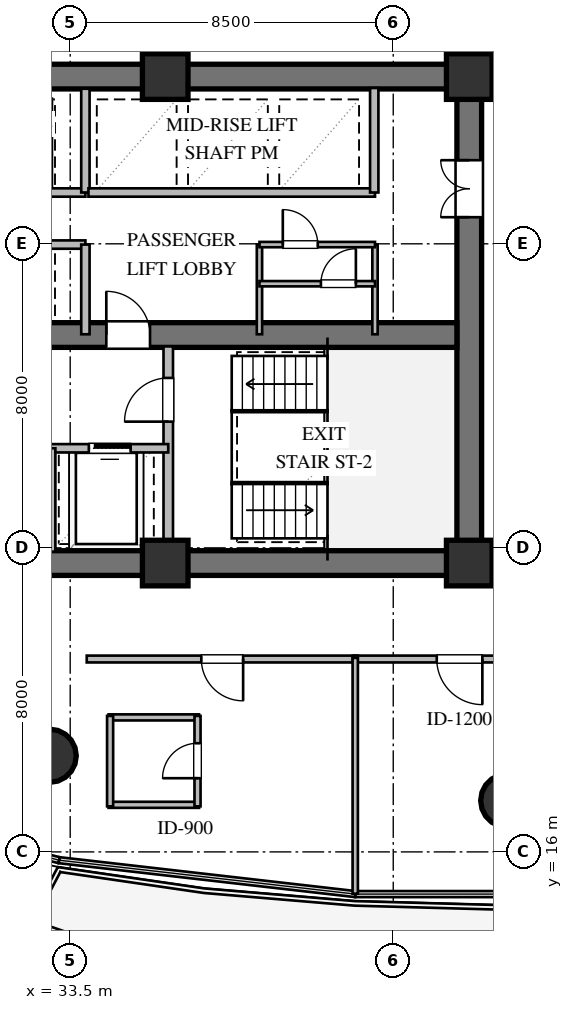
"""IFC4 building model, lengths in metres.
Left out: names, types, materials, properties, quantities, classifications, styles, units other than length and angle.
Written with IfcOpenShell. Run it as: python <this file> out.ifc"""

import sys

from ifc_helpers import new_model, si_unit, direction, frame, frame_2d, origin, origin_2d, place, context, subcontext, project, spatial, rectangle, circle, extrude, element, fill, save


model = new_model("IFC4")
c1 = context("Model", 3, precision=1e-05, world=origin(), true_north=direction((0.0, 1.0)))
c2 = subcontext(c1, "Body", "Model", "MODEL_VIEW")
j1 = project(units=[si_unit("LENGTHUNIT", "METRE"), si_unit("PLANEANGLEUNIT", "RADIAN")], contexts=[c1])
p1 = place(None, origin())
s1 = spatial("IfcSite", under=j1, at=p1, CompositionType="ELEMENT")
p2 = place(p1, origin())
s2 = spatial("IfcBuilding", under=s1, at=p2, CompositionType="ELEMENT")
p3 = place(p2, frame((0.0, 0.0, 24.0)))
s3 = spatial("IfcBuildingStorey", under=s2, at=p3, CompositionType="ELEMENT", Elevation=24.0)
for number, where, z_axis, x_axis in (
    (1, (21.675, 23.6, 0.0), (0.0, 0.0, 1.0), (1.0, 0.0, 0.0)),
    (2, (21.675, 36.4, 0.0), (0.0, 0.0, 1.0), (1.0, 0.0, 0.0)),
):
    element("IfcWall", number, at=place(p3, frame(where, z_axis=z_axis, x_axis=x_axis)), inside=s3, PredefinedType="SHEAR", context=c2, shape_type="SweptSolid", body=[
        extrude(rectangle(XDim=22.65, YDim=0.65, at=frame_2d((11.325, 0.0))), origin(), (0.0, 0.0, 1.0), 3.36),
    ])
p4 = place(p3, frame((44.0, 23.925, 0.0), z_axis=(0.0, 0.0, 1.0), x_axis=(0.0, 1.0, 0.0)))
e3 = element("IfcWall", 3, at=p4, inside=s3, PredefinedType="SHEAR", context=c2, shape_type="SweptSolid", body=[
    extrude(rectangle(XDim=12.15, YDim=0.65, at=frame_2d((6.075, 0.0))), origin(), (0.0, 0.0, 1.0), 3.36),
])
p5 = place(p4, frame((8.775, 0.0, 0.0)))
e4 = element("IfcOpeningElement", 4, at=p5, cuts=e3, PredefinedType="OPENING", context=c2, shape_type="SweptSolid", body=[
    extrude(rectangle(XDim=1.5, YDim=2.15, at=frame_2d((0.75, 1.075))), frame((0.0, 0.335, 0.0), z_axis=(0.0, -1.0, 0.0), x_axis=(1.0, 0.0, 0.0)), (0.0, 0.0, 1.0), 0.67),
])
p6 = place(p3, frame((22.325, 29.6, 0.0), z_axis=(0.0, 0.0, 1.0), x_axis=(1.0, 0.0, 0.0)))
e5 = element("IfcWall", 5, at=p6, inside=s3, PredefinedType="SHEAR", context=c2, shape_type="SweptSolid", body=[
    extrude(rectangle(XDim=21.35, YDim=0.65, at=frame_2d((10.675, 0.0))), origin(), (0.0, 0.0, 1.0), 3.36),
])
p7 = place(p6, frame((12.125, 0.0, 0.0)))
e6 = element("IfcOpeningElement", 6, at=p7, cuts=e5, PredefinedType="OPENING", context=c2, shape_type="SweptSolid", body=[
    extrude(rectangle(XDim=1.15, YDim=2.1, at=frame_2d((0.575, 1.05))), frame((0.0, 0.335, 0.0), z_axis=(0.0, -1.0, 0.0), x_axis=(1.0, 0.0, 0.0)), (0.0, 0.0, 1.0), 0.67),
])
for number, where, z_axis, x_axis in (
    (7, (36.0, 23.6, 0.0), (0.0, 0.0, 1.0), (1.0, 0.0, 0.0)),
    (8, (44.0, 23.6, 0.0), (0.0, 0.0, 1.0), (1.0, 0.0, 0.0)),
    (9, (44.0, 36.4, 0.0), (0.0, 0.0, 1.0), (1.0, 0.0, 0.0)),
    (10, (36.0, 36.4, 0.0), (0.0, 0.0, 1.0), (1.0, 0.0, 0.0)),
):
    element("IfcColumn", number, at=place(p3, frame(where, z_axis=z_axis, x_axis=x_axis)), inside=s3, PredefinedType="COLUMN", context=c2, shape_type="SweptSolid", body=[
        extrude(rectangle(XDim=1.2, YDim=1.2, at=origin_2d()), origin(), (0.0, 0.0, 1.0), 3.6),
    ])
for number, where, z_axis, x_axis in (
    (11, (32.96, 18.53, 0.0), (0.0, 0.0, 1.0), (1.0, 0.0, 0.0)),
    (12, (45.0, 17.35, 0.0), (0.0, 0.0, 1.0), (1.0, 0.0, 0.0)),
):
    element("IfcColumn", number, at=place(p3, frame(where, z_axis=z_axis, x_axis=x_axis)), inside=s3, PredefinedType="COLUMN", context=c2, shape_type="SweptSolid", body=[
        extrude(circle(Radius=0.7, at=origin_2d()), origin(), (0.0, 0.0, 1.0), 3.6),
    ])
p8 = place(p3, frame((36.08, 23.9, 0.0), z_axis=(0.0, 0.0, 1.0), x_axis=(0.0, 1.0, 0.0)))
e13 = element("IfcWall", 13, at=p8, inside=s3, PredefinedType="SOLIDWALL", context=c2, shape_type="SweptSolid", body=[
    extrude(rectangle(XDim=5.4, YDim=0.25, at=frame_2d((2.7, 0.0))), origin(), (0.0, 0.0, 1.0), 3.36),
])
p9 = place(p8, frame((3.421, 0.0, 0.0)))
e14 = element("IfcOpeningElement", 14, at=p9, cuts=e13, PredefinedType="OPENING", context=c2, shape_type="SweptSolid", body=[
    extrude(rectangle(XDim=1.15, YDim=2.1, at=frame_2d((0.575, 1.05))), frame((0.0, 0.135, 0.0), z_axis=(0.0, -1.0, 0.0), x_axis=(1.0, 0.0, 0.0)), (0.0, 0.0, 1.0), 0.27),
])
p10 = place(p3, frame((29.92, 26.62, 0.0), z_axis=(0.0, 0.0, 1.0), x_axis=(1.0, 0.0, 0.0)))
e15 = element("IfcWall", 15, at=p10, inside=s3, PredefinedType="SOLIDWALL", context=c2, shape_type="SweptSolid", body=[
    extrude(rectangle(XDim=6.16, YDim=0.22, at=frame_2d((3.08, 0.0))), origin(), (0.0, 0.0, 1.0), 3.36),
])
p11 = place(p10, frame((0.99, 0.0, 0.0)))
e16 = element("IfcOpeningElement", 16, at=p11, cuts=e15, PredefinedType="OPENING", context=c2, shape_type="SweptSolid", body=[
    extrude(rectangle(XDim=1.1, YDim=2.1, at=frame_2d((0.55, 1.05))), frame((0.0, 0.12, 0.0), z_axis=(0.0, -1.0, 0.0), x_axis=(1.0, 0.0, 0.0)), (0.0, 0.0, 1.0), 0.24),
])
p12 = place(p10, frame((4.07, 0.0, 0.0)))
e17 = element("IfcOpeningElement", 17, at=p12, cuts=e15, PredefinedType="OPENING", context=c2, shape_type="SweptSolid", body=[
    extrude(rectangle(XDim=1.1, YDim=2.1, at=frame_2d((0.55, 1.05))), frame((0.0, 0.12, 0.0), z_axis=(0.0, -1.0, 0.0), x_axis=(1.0, 0.0, 0.0)), (0.0, 0.0, 1.0), 0.24),
])
p13 = place(p3, frame((33.0, 23.9, 0.0), z_axis=(0.0, 0.0, 1.0), x_axis=(0.0, 1.0, 0.0)))
e18 = element("IfcWall", 18, at=p13, inside=s3, PredefinedType="SOLIDWALL", context=c2, shape_type="SweptSolid", body=[
    extrude(rectangle(XDim=2.72, YDim=0.22, at=frame_2d((1.36, 0.0))), origin(), (0.0, 0.0, 1.0), 3.36),
])
p14 = place(p3, frame((26.1, 31.98, 0.0), z_axis=(0.0, 0.0, 1.0), x_axis=(1.0, 0.0, 0.0)))
e19 = element("IfcWall", 19, at=p14, inside=s3, PredefinedType="SOLIDWALL", context=c2, shape_type="SweptSolid", body=[
    extrude(rectangle(XDim=7.8, YDim=0.22, at=frame_2d((3.9, 0.0))), origin(), (0.0, 0.0, 1.0), 3.36),
])
p15 = place(p3, frame((33.9, 29.62, 0.0), z_axis=(0.0, 0.0, 1.0), x_axis=(0.0, 1.0, 0.0)))
e20 = element("IfcWall", 20, at=p15, inside=s3, PredefinedType="SOLIDWALL", context=c2, shape_type="SweptSolid", body=[
    extrude(rectangle(XDim=2.36, YDim=0.22, at=frame_2d((1.18, 0.0))), origin(), (0.0, 0.0, 1.0), 3.36),
])
p16 = place(p3, frame((26.1, 33.35, 0.0), z_axis=(0.0, 0.0, 1.0), x_axis=(1.0, 0.0, 0.0)))
e21 = element("IfcWall", 21, at=p16, inside=s3, PredefinedType="SOLIDWALL", context=c2, shape_type="SweptSolid", body=[
    extrude(rectangle(XDim=7.8, YDim=0.22, at=frame_2d((3.9, 0.0))), origin(), (0.0, 0.0, 1.0), 3.36),
])
p17 = place(p16, frame((1.4, 0.0, 0.0)))
e22 = element("IfcOpeningElement", 22, at=p17, cuts=e21, PredefinedType="OPENING", context=c2, shape_type="SweptSolid", body=[
    extrude(rectangle(XDim=1.1, YDim=2.1, at=frame_2d((0.55, 1.05))), frame((0.0, 0.12, 0.0), z_axis=(0.0, -1.0, 0.0), x_axis=(1.0, 0.0, 0.0)), (0.0, 0.0, 1.0), 0.24),
])
p18 = place(p16, frame((5.066, 0.0, 0.0)))
e23 = element("IfcOpeningElement", 23, at=p18, cuts=e21, PredefinedType="OPENING", context=c2, shape_type="SweptSolid", body=[
    extrude(rectangle(XDim=1.1, YDim=2.1, at=frame_2d((0.55, 1.05))), frame((0.0, 0.12, 0.0), z_axis=(0.0, -1.0, 0.0), x_axis=(1.0, 0.0, 0.0)), (0.0, 0.0, 1.0), 0.24),
])
p19 = place(p3, frame((33.9, 33.35, 0.0), z_axis=(0.0, 0.0, 1.0), x_axis=(0.0, 1.0, 0.0)))
e24 = element("IfcWall", 24, at=p19, inside=s3, PredefinedType="SOLIDWALL", context=c2, shape_type="SweptSolid", body=[
    extrude(rectangle(XDim=2.73, YDim=0.22, at=frame_2d((1.365, 0.0))), origin(), (0.0, 0.0, 1.0), 3.36),
])
p20 = place(p3, frame((33.98, 33.35, 0.0), z_axis=(0.0, 0.0, 1.0), x_axis=(1.0, 0.0, 0.0)))
e25 = element("IfcWall", 25, at=p20, inside=s3, PredefinedType="SOLIDWALL", context=c2, shape_type="SweptSolid", body=[
    extrude(rectangle(XDim=7.54, YDim=0.22, at=frame_2d((3.77, 0.0))), origin(), (0.0, 0.0, 1.0), 3.36),
])
p21 = place(p3, frame((41.5, 33.35, 0.0), z_axis=(0.0, 0.0, 1.0), x_axis=(0.0, 1.0, 0.0)))
e26 = element("IfcWall", 26, at=p21, inside=s3, PredefinedType="SOLIDWALL", context=c2, shape_type="SweptSolid", body=[
    extrude(rectangle(XDim=2.75, YDim=0.22, at=frame_2d((1.375, 0.0))), origin(), (0.0, 0.0, 1.0), 3.36),
])
for number, where, z_axis, x_axis in (
    (27, (38.48, 29.62, 0.0), (0.0, 0.0, 1.0), (0.0, 1.0, 0.0)),
    (28, (41.52, 29.62, 0.0), (0.0, 0.0, 1.0), (0.0, 1.0, 0.0)),
):
    element("IfcWall", number, at=place(p3, frame(where, z_axis=z_axis, x_axis=x_axis)), inside=s3, PredefinedType="PARTITIONING", context=c2, shape_type="SweptSolid", body=[
        extrude(rectangle(XDim=2.36, YDim=0.14, at=frame_2d((1.18, 0.0))), origin(), (0.0, 0.0, 1.0), 3.36),
    ])
p22 = place(p3, frame((38.48, 30.95, 0.0), z_axis=(0.0, 0.0, 1.0), x_axis=(1.0, 0.0, 0.0)))
e29 = element("IfcWall", 29, at=p22, inside=s3, PredefinedType="PARTITIONING", context=c2, shape_type="SweptSolid", body=[
    extrude(rectangle(XDim=3.04, YDim=0.14, at=frame_2d((1.52, 0.0))), origin(), (0.0, 0.0, 1.0), 3.36),
])
p23 = place(p22, frame((1.617, 0.0, 0.0)))
e30 = element("IfcOpeningElement", 30, at=p23, cuts=e29, PredefinedType="OPENING", context=c2, shape_type="SweptSolid", body=[
    extrude(rectangle(XDim=0.92, YDim=2.1, at=frame_2d((0.46, 1.05))), frame((0.0, 0.08, 0.0), z_axis=(0.0, -1.0, 0.0), x_axis=(1.0, 0.0, 0.0)), (0.0, 0.0, 1.0), 0.16),
])
p24 = place(p3, frame((38.48, 31.98, 0.0), z_axis=(0.0, 0.0, 1.0), x_axis=(1.0, 0.0, 0.0)))
e31 = element("IfcWall", 31, at=p24, inside=s3, PredefinedType="PARTITIONING", context=c2, shape_type="SweptSolid", body=[
    extrude(rectangle(XDim=3.04, YDim=0.14, at=frame_2d((1.52, 0.0))), origin(), (0.0, 0.0, 1.0), 3.36),
])
p25 = place(p24, frame((0.614, 0.0, 0.0)))
e32 = element("IfcOpeningElement", 32, at=p25, cuts=e31, PredefinedType="OPENING", context=c2, shape_type="SweptSolid", body=[
    extrude(rectangle(XDim=0.92, YDim=2.1, at=frame_2d((0.46, 1.05))), frame((0.0, 0.08, 0.0), z_axis=(0.0, -1.0, 0.0), x_axis=(1.0, 0.0, 0.0)), (0.0, 0.0, 1.0), 0.16),
])
for number, where, z_axis, x_axis in (
    (33, (34.51, 17.239, 0.0), (0.0, 0.0, 1.0), (1.0, 0.0, 0.0)),
    (34, (34.51, 19.539, 0.0), (0.0, 0.0, 1.0), (1.0, 0.0, 0.0)),
):
    element("IfcWall", number, at=place(p3, frame(where, z_axis=z_axis, x_axis=x_axis)), inside=s3, PredefinedType="PLUMBINGWALL", context=c2, shape_type="SweptSolid", body=[
        extrude(rectangle(XDim=2.38, YDim=0.16, at=frame_2d((1.19, 0.0))), origin(), (0.0, 0.0, 1.0), 3.36),
    ])
p26 = place(p3, frame((34.55, 17.199, 0.0), z_axis=(0.0, 0.0, 1.0), x_axis=(0.0, 1.0, 0.0)))
e35 = element("IfcWall", 35, at=p26, inside=s3, PredefinedType="PLUMBINGWALL", context=c2, shape_type="SweptSolid", body=[
    extrude(rectangle(XDim=2.38, YDim=0.16, at=frame_2d((1.19, 0.0))), origin(), (0.0, 0.0, 1.0), 3.36),
])
p27 = place(p3, frame((36.85, 17.199, 0.0), z_axis=(0.0, 0.0, 1.0), x_axis=(0.0, 1.0, 0.0)))
e36 = element("IfcWall", 36, at=p27, inside=s3, PredefinedType="PLUMBINGWALL", context=c2, shape_type="SweptSolid", body=[
    extrude(rectangle(XDim=2.38, YDim=0.16, at=frame_2d((1.19, 0.0))), origin(), (0.0, 0.0, 1.0), 3.36),
])
p28 = place(p27, frame((0.74, 0.0, 0.0)))
e37 = element("IfcOpeningElement", 37, at=p28, cuts=e36, PredefinedType="OPENING", context=c2, shape_type="SweptSolid", body=[
    extrude(rectangle(XDim=0.92, YDim=2.1, at=frame_2d((0.46, 1.05))), frame((0.0, 0.09, 0.0), z_axis=(0.0, -1.0, 0.0), x_axis=(1.0, 0.0, 0.0)), (0.0, 0.0, 1.0), 0.18),
])
p29 = place(p3, frame((41.065, 21.075, 0.0), z_axis=(0.0, 0.0, 1.0), x_axis=(-1.0, 0.0, 0.0)))
e38 = element("IfcWall", 38, at=p29, inside=s3, PredefinedType="PARTITIONING", context=c2, shape_type="SweptSolid", body=[
    extrude(rectangle(XDim=7.13, YDim=0.18, at=frame_2d((3.565, 0.0))), origin(), (0.0, 0.0, 1.0), 2.996),
])
p30 = place(p29, frame((3.015, 0.0, 0.0)))
e39 = element("IfcOpeningElement", 39, at=p30, cuts=e38, PredefinedType="OPENING", context=c2, shape_type="SweptSolid", body=[
    extrude(rectangle(XDim=1.1, YDim=2.1, at=frame_2d((0.55, 1.05))), frame((0.0, 0.1, 0.0), z_axis=(0.0, -1.0, 0.0), x_axis=(1.0, 0.0, 0.0)), (0.0, 0.0, 1.0), 0.2),
])
p31 = place(p3, frame((46.555, 21.075, 0.0), z_axis=(0.0, 0.0, 1.0), x_axis=(-1.0, 0.0, 0.0)))
e40 = element("IfcWall", 40, at=p31, inside=s3, PredefinedType="PARTITIONING", context=c2, shape_type="SweptSolid", body=[
    extrude(rectangle(XDim=5.62, YDim=0.18, at=frame_2d((2.81, 0.0))), origin(), (0.0, 0.0, 1.0), 3.36),
])
p32 = place(p31, frame((2.21, 0.0, 0.0)))
e41 = element("IfcOpeningElement", 41, at=p32, cuts=e40, PredefinedType="OPENING", context=c2, shape_type="SweptSolid", body=[
    extrude(rectangle(XDim=1.2, YDim=2.15, at=frame_2d((0.6, 1.075))), frame((0.0, 0.1, 0.0), z_axis=(0.0, -1.0, 0.0), x_axis=(1.0, 0.0, 0.0)), (0.0, 0.0, 1.0), 0.2),
])
p33 = place(p3, frame((41.0, 21.105, 0.0), z_axis=(0.0, 0.0, 1.0), x_axis=(0.0, -1.0, 0.0)))
e42 = element("IfcWall", 42, at=p33, inside=s3, PredefinedType="PARTITIONING", context=c2, shape_type="SweptSolid", body=[
    extrude(rectangle(XDim=6.205, YDim=0.14, at=frame_2d((3.103, 0.0))), origin(), (0.0, 0.0, 1.0), 3.36),
])
p34 = place(p9, origin())
e43 = element("IfcDoor", 43, at=p34, inside=s3, OperationType="SINGLE_SWING_LEFT", PredefinedType="DOOR", context=c2, shape_type="SweptSolid", body=[
    extrude(rectangle(XDim=1.15, YDim=2.1, at=frame_2d((0.575, 1.05))), frame((0.0, 0.025, 0.0), z_axis=(0.0, -1.0, 0.0), x_axis=(1.0, 0.0, 0.0)), (0.0, 0.0, 1.0), 0.05),
])
fill(e14, e43)
p35 = place(p12, origin())
e44 = element("IfcDoor", 44, at=p35, inside=s3, OperationType="SLIDING_TO_RIGHT", PredefinedType="DOOR", context=c2, shape_type="SweptSolid", body=[
    extrude(rectangle(XDim=1.1, YDim=2.1, at=frame_2d((0.55, 1.05))), frame((0.0, 0.025, 0.0), z_axis=(0.0, -1.0, 0.0), x_axis=(1.0, 0.0, 0.0)), (0.0, 0.0, 1.0), 0.05),
])
fill(e17, e44)
p36 = place(p7, origin())
e45 = element("IfcDoor", 45, at=p36, inside=s3, OperationType="SINGLE_SWING_LEFT", PredefinedType="DOOR", context=c2, shape_type="SweptSolid", body=[
    extrude(rectangle(XDim=1.15, YDim=2.1, at=frame_2d((0.575, 1.05))), frame((0.0, 0.025, 0.0), z_axis=(0.0, -1.0, 0.0), x_axis=(1.0, 0.0, 0.0)), (0.0, 0.0, 1.0), 0.05),
])
fill(e6, e45)
p37 = place(p5, origin())
e46 = element("IfcDoor", 46, at=p37, inside=s3, OperationType="DOUBLE_DOOR_SINGLE_SWING", PredefinedType="DOOR", context=c2, shape_type="SweptSolid", body=[
    extrude(rectangle(XDim=1.5, YDim=2.15, at=frame_2d((0.75, 1.075))), frame((0.0, 0.025, 0.0), z_axis=(0.0, -1.0, 0.0), x_axis=(1.0, 0.0, 0.0)), (0.0, 0.0, 1.0), 0.05),
])
fill(e4, e46)
p38 = place(p25, origin())
e47 = element("IfcDoor", 47, at=p38, inside=s3, OperationType="SINGLE_SWING_LEFT", PredefinedType="DOOR", context=c2, shape_type="SweptSolid", body=[
    extrude(rectangle(XDim=0.92, YDim=2.1, at=frame_2d((0.46, 1.05))), frame((0.0, 0.025, 0.0), z_axis=(0.0, -1.0, 0.0), x_axis=(1.0, 0.0, 0.0)), (0.0, 0.0, 1.0), 0.05),
])
fill(e32, e47)
p39 = place(p23, origin())
e48 = element("IfcDoor", 48, at=p39, inside=s3, OperationType="SINGLE_SWING_RIGHT", PredefinedType="DOOR", context=c2, shape_type="SweptSolid", body=[
    extrude(rectangle(XDim=0.92, YDim=2.1, at=frame_2d((0.46, 1.05))), frame((0.0, 0.025, 0.0), z_axis=(0.0, -1.0, 0.0), x_axis=(1.0, 0.0, 0.0)), (0.0, 0.0, 1.0), 0.05),
])
fill(e30, e48)
p40 = place(p28, origin())
e49 = element("IfcDoor", 49, at=p40, inside=s3, OperationType="SINGLE_SWING_LEFT", PredefinedType="DOOR", context=c2, shape_type="SweptSolid", body=[
    extrude(rectangle(XDim=0.92, YDim=2.1, at=frame_2d((0.46, 1.05))), frame((0.0, 0.025, 0.0), z_axis=(0.0, -1.0, 0.0), x_axis=(1.0, 0.0, 0.0)), (0.0, 0.0, 1.0), 0.05),
])
fill(e37, e49)
p41 = place(p30, origin())
e50 = element("IfcDoor", 50, at=p41, inside=s3, OperationType="SINGLE_SWING_LEFT", PredefinedType="DOOR", context=c2, shape_type="SweptSolid", body=[
    extrude(rectangle(XDim=1.1, YDim=2.1, at=frame_2d((0.55, 1.05))), frame((0.0, 0.025, 0.0), z_axis=(0.0, -1.0, 0.0), x_axis=(1.0, 0.0, 0.0)), (0.0, 0.0, 1.0), 0.05),
])
fill(e39, e50)
p42 = place(p32, origin())
e51 = element("IfcDoor", 51, at=p42, inside=s3, OperationType="SINGLE_SWING_LEFT", PredefinedType="DOOR", context=c2, shape_type="SweptSolid", body=[
    extrude(rectangle(XDim=1.2, YDim=2.15, at=frame_2d((0.6, 1.075))), frame((0.0, 0.025, 0.0), z_axis=(0.0, -1.0, 0.0), x_axis=(1.0, 0.0, 0.0)), (0.0, 0.0, 1.0), 0.05),
])
fill(e41, e51)
save(model, sys.argv[1])
